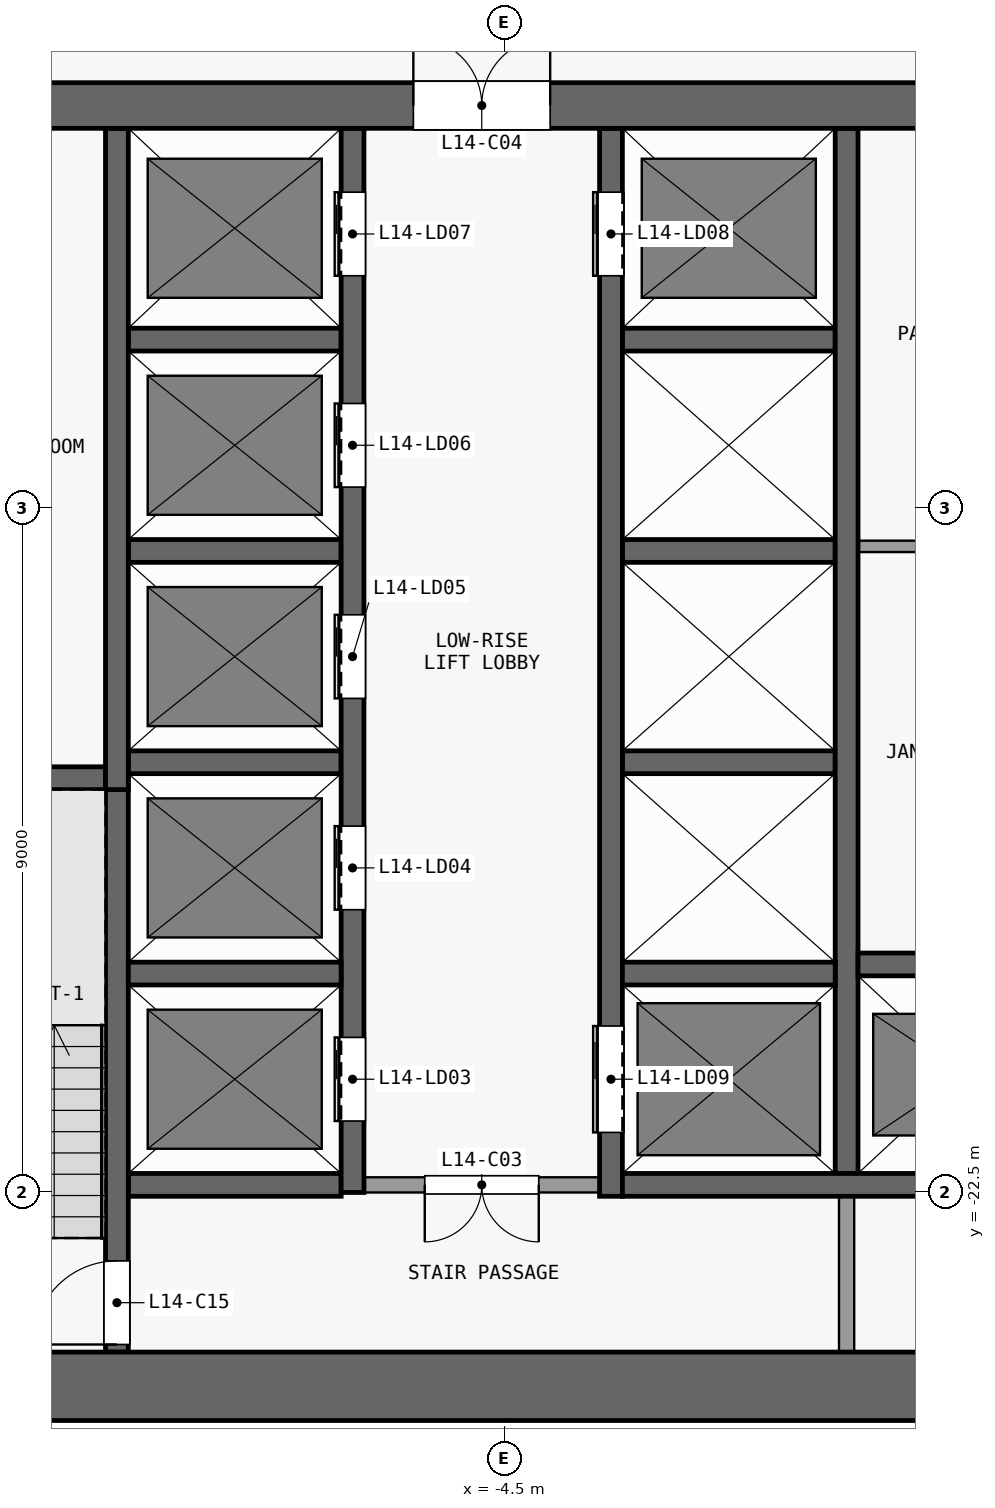
"""IFC4 building model, lengths in metres.
Left out: names, types, materials, properties, quantities, classifications, styles, units other than length and angle.
Written with IfcOpenShell. Run it as: python <this file> out.ifc"""

import sys

from ifc_helpers import new_model, si_unit, direction, frame, frame_2d, origin, place, context, subcontext, project, spatial, rectangle, extrude, element, fill, save


model = new_model("IFC4")
c1 = context("Model", 3, precision=1e-05, world=origin(), true_north=direction((0.0, 1.0)))
c2 = subcontext(c1, "Body", "Model", "MODEL_VIEW")
j1 = project(units=[si_unit("LENGTHUNIT", "METRE"), si_unit("PLANEANGLEUNIT", "RADIAN")], contexts=[c1])
p1 = place(None, origin())
s1 = spatial("IfcSite", under=j1, at=p1, CompositionType="ELEMENT")
p2 = place(p1, origin())
s2 = spatial("IfcBuilding", under=s1, at=p2, CompositionType="ELEMENT")
p3 = place(p2, frame((0.0, 0.0, 61.3)))
s3 = spatial("IfcBuildingStorey", under=s2, at=p3, CompositionType="ELEMENT", Elevation=61.3)
p4 = place(p3, frame((-13.5, -25.05, 0.0), z_axis=(0.0, 0.0, 1.0), x_axis=(1.0, 0.0, 0.0)))
e1 = element("IfcWall", 1, at=p4, inside=s3, PredefinedType="SHEAR", context=c2, shape_type="SweptSolid", body=[
    extrude(rectangle(XDim=27.0, YDim=0.9, at=frame_2d((13.5, 0.0))), origin(), (0.0, 0.0, 1.0), 3.3),
])
p5 = place(p3, frame((-13.5, -8.2, 0.0), z_axis=(0.0, 0.0, 1.0), x_axis=(1.0, 0.0, 0.0)))
e2 = element("IfcWall", 2, at=p5, inside=s3, PredefinedType="SHEAR", context=c2, shape_type="SweptSolid", body=[
    extrude(rectangle(XDim=27.0, YDim=0.6, at=frame_2d((13.5, 0.0))), origin(), (0.0, 0.0, 1.0), 3.3),
])
p6 = place(p5, frame((7.8, 0.0, 0.0)))
e3 = element("IfcOpeningElement", 3, at=p6, cuts=e2, PredefinedType="OPENING", context=c2, shape_type="SweptSolid", body=[
    extrude(rectangle(XDim=1.8, YDim=2.1, at=frame_2d((0.9, 1.05))), frame((0.0, 0.31, 0.0), z_axis=(0.0, -1.0, 0.0), x_axis=(1.0, 0.0, 0.0)), (0.0, 0.0, 1.0), 0.62),
])
p7 = place(p5, frame((17.4, 0.0, 0.0)))
e4 = element("IfcOpeningElement", 4, at=p7, cuts=e2, PredefinedType="OPENING", context=c2, shape_type="SweptSolid", body=[
    extrude(rectangle(XDim=1.8, YDim=2.1, at=frame_2d((0.9, 1.05))), frame((0.0, 0.31, 0.0), z_axis=(0.0, -1.0, 0.0), x_axis=(1.0, 0.0, 0.0)), (0.0, 0.0, 1.0), 0.62),
])
p8 = place(p5, frame((1.725, 0.0, 0.0)))
e5 = element("IfcOpeningElement", 5, at=p8, cuts=e2, PredefinedType="OPENING", context=c2, shape_type="SweptSolid", body=[
    extrude(rectangle(XDim=1.2, YDim=2.1, at=frame_2d((0.6, 1.05))), frame((0.0, 0.31, 0.0), z_axis=(0.0, -1.0, 0.0), x_axis=(1.0, 0.0, 0.0)), (0.0, 0.0, 1.0), 0.62),
])
p9 = place(p5, frame((23.375, 0.0, 0.0)))
e6 = element("IfcOpeningElement", 6, at=p9, cuts=e2, PredefinedType="OPENING", context=c2, shape_type="SweptSolid", body=[
    extrude(rectangle(XDim=0.9, YDim=2.1, at=frame_2d((0.45, 1.05))), frame((0.0, 0.31, 0.0), z_axis=(0.0, -1.0, 0.0), x_axis=(1.0, 0.0, 0.0)), (0.0, 0.0, 1.0), 0.62),
])
p10 = place(p3, frame((-9.45, -22.4, 0.0), z_axis=(0.0, 0.0, 1.0), x_axis=(1.0, 0.0, 0.0)))
e7 = element("IfcWall", 7, at=p10, inside=s3, PredefinedType="SHEAR", context=c2, shape_type="SweptSolid", body=[
    extrude(rectangle(XDim=2.8, YDim=0.3, at=frame_2d((1.4, 0.0))), origin(), (0.0, 0.0, 1.0), 3.3),
])
p11 = place(p3, frame((-3.25, -22.4, 0.0), z_axis=(0.0, 0.0, 1.0), x_axis=(-1.0, 0.0, 0.0)))
e8 = element("IfcWall", 8, at=p11, inside=s3, PredefinedType="PARTITIONING", context=c2, shape_type="SweptSolid", body=[
    extrude(rectangle(XDim=3.1, YDim=0.2, at=frame_2d((1.55, 0.0))), origin(), (0.0, 0.0, 1.0), 3.3),
])
p12 = place(p11, frame((0.8, 0.0, 0.0)))
e9 = element("IfcOpeningElement", 9, at=p12, cuts=e8, PredefinedType="OPENING", context=c2, shape_type="SweptSolid", body=[
    extrude(rectangle(XDim=1.5, YDim=2.1, at=frame_2d((0.75, 1.05))), frame((0.0, 0.11, 0.0), z_axis=(0.0, -1.0, 0.0), x_axis=(1.0, 0.0, 0.0)), (0.0, 0.0, 1.0), 0.22),
])
p13 = place(p3, frame((-2.95, -22.4, 0.0), z_axis=(0.0, 0.0, 1.0), x_axis=(1.0, 0.0, 0.0)))
e10 = element("IfcWall", 10, at=p13, inside=s3, PredefinedType="SHEAR", context=c2, shape_type="SweptSolid", body=[
    extrude(rectangle(XDim=6.2, YDim=0.3, at=frame_2d((3.1, 0.0))), origin(), (0.0, 0.0, 1.0), 3.3),
])
for number, where, z_axis, x_axis in (
    (11, (-9.45, -19.62, 0.0), (0.0, 0.0, 1.0), (1.0, 0.0, 0.0)),
    (12, (-2.95, -19.62, 0.0), (0.0, 0.0, 1.0), (1.0, 0.0, 0.0)),
):
    element("IfcWall", number, at=place(p3, frame(where, z_axis=z_axis, x_axis=x_axis)), inside=s3, PredefinedType="SHEAR", context=c2, shape_type="SweptSolid", body=[
        extrude(rectangle(XDim=2.8, YDim=0.3, at=frame_2d((1.4, 0.0))), origin(), (0.0, 0.0, 1.0), 3.3),
    ])
p14 = place(p3, frame((0.15, -19.5, 0.0), z_axis=(0.0, 0.0, 1.0), x_axis=(1.0, 0.0, 0.0)))
e13 = element("IfcWall", 13, at=p14, inside=s3, PredefinedType="SHEAR", context=c2, shape_type="SweptSolid", body=[
    extrude(rectangle(XDim=3.025, YDim=0.3, at=frame_2d((1.513, 0.0))), origin(), (0.0, 0.0, 1.0), 3.3),
])
p15 = place(p3, frame((-12.6, -17.05, 0.0), z_axis=(0.0, 0.0, 1.0), x_axis=(1.0, 0.0, 0.0)))
e14 = element("IfcWall", 14, at=p15, inside=s3, PredefinedType="SHEAR", context=c2, shape_type="SweptSolid", body=[
    extrude(rectangle(XDim=2.85, YDim=0.3, at=frame_2d((1.425, 0.0))), origin(), (0.0, 0.0, 1.0), 3.3),
])
for number, where, z_axis, x_axis in (
    (15, (-9.45, -16.84, 0.0), (0.0, 0.0, 1.0), (1.0, 0.0, 0.0)),
    (16, (-2.95, -16.84, 0.0), (0.0, 0.0, 1.0), (1.0, 0.0, 0.0)),
    (17, (-9.45, -14.06, 0.0), (0.0, 0.0, 1.0), (1.0, 0.0, 0.0)),
    (18, (-2.95, -14.06, 0.0), (0.0, 0.0, 1.0), (1.0, 0.0, 0.0)),
):
    element("IfcWall", number, at=place(p3, frame(where, z_axis=z_axis, x_axis=x_axis)), inside=s3, PredefinedType="SHEAR", context=c2, shape_type="SweptSolid", body=[
        extrude(rectangle(XDim=2.8, YDim=0.3, at=frame_2d((1.4, 0.0))), origin(), (0.0, 0.0, 1.0), 3.3),
    ])
p16 = place(p3, frame((0.15, -14.0, 0.0), z_axis=(0.0, 0.0, 1.0), x_axis=(1.0, 0.0, 0.0)))
e19 = element("IfcWall", 19, at=p16, inside=s3, PredefinedType="PARTITIONING", context=c2, shape_type="SweptSolid", body=[
    extrude(rectangle(XDim=2.875, YDim=0.15, at=frame_2d((1.438, 0.0))), origin(), (0.0, 0.0, 1.0), 3.3),
])
for number, where, z_axis, x_axis in (
    (20, (-9.45, -11.28, 0.0), (0.0, 0.0, 1.0), (1.0, 0.0, 0.0)),
    (21, (-2.95, -11.28, 0.0), (0.0, 0.0, 1.0), (1.0, 0.0, 0.0)),
):
    element("IfcWall", number, at=place(p3, frame(where, z_axis=z_axis, x_axis=x_axis)), inside=s3, PredefinedType="SHEAR", context=c2, shape_type="SweptSolid", body=[
        extrude(rectangle(XDim=2.8, YDim=0.3, at=frame_2d((1.4, 0.0))), origin(), (0.0, 0.0, 1.0), 3.3),
    ])
p17 = place(p3, frame((-9.6, -24.6, 0.0), z_axis=(0.0, 0.0, 1.0), x_axis=(0.0, 1.0, 0.0)))
e22 = element("IfcWall", 22, at=p17, inside=s3, PredefinedType="SHEAR", context=c2, shape_type="SweptSolid", body=[
    extrude(rectangle(XDim=7.7, YDim=0.3, at=frame_2d((3.85, 0.0))), origin(), (0.0, 0.0, 1.0), 3.3),
])
p18 = place(p17, frame((0.1, 0.0, 0.0)))
e23 = element("IfcOpeningElement", 23, at=p18, cuts=e22, PredefinedType="OPENING", context=c2, shape_type="SweptSolid", body=[
    extrude(rectangle(XDim=1.1, YDim=2.1, at=frame_2d((0.55, 1.05))), frame((0.0, 0.16, 0.0), z_axis=(0.0, -1.0, 0.0), x_axis=(1.0, 0.0, 0.0)), (0.0, 0.0, 1.0), 0.32),
])
p19 = place(p3, frame((-9.6, -17.2, 0.0), z_axis=(0.0, 0.0, 1.0), x_axis=(0.0, 1.0, 0.0)))
e24 = element("IfcWall", 24, at=p19, inside=s3, PredefinedType="SHEAR", context=c2, shape_type="SweptSolid", body=[
    extrude(rectangle(XDim=8.7, YDim=0.3, at=frame_2d((4.35, 0.0))), origin(), (0.0, 0.0, 1.0), 3.3),
])
p20 = place(p3, frame((-6.5, -22.5, 0.0), z_axis=(0.0, 0.0, 1.0), x_axis=(0.0, 1.0, 0.0)))
e25 = element("IfcWall", 25, at=p20, inside=s3, PredefinedType="SHEAR", context=c2, shape_type="SweptSolid", body=[
    extrude(rectangle(XDim=14.0, YDim=0.3, at=frame_2d((7.0, 0.0))), origin(), (0.0, 0.0, 1.0), 3.3),
])
p21 = place(p20, frame((0.94, 0.0, 0.0)))
e26 = element("IfcOpeningElement", 26, at=p21, cuts=e25, PredefinedType="OPENING", context=c2, shape_type="SweptSolid", body=[
    extrude(rectangle(XDim=1.1, YDim=2.1, at=frame_2d((0.55, 1.05))), frame((0.0, 0.16, 0.0), z_axis=(0.0, -1.0, 0.0), x_axis=(1.0, 0.0, 0.0)), (0.0, 0.0, 1.0), 0.32),
])
p22 = place(p20, frame((3.72, 0.0, 0.0)))
e27 = element("IfcOpeningElement", 27, at=p22, cuts=e25, PredefinedType="OPENING", context=c2, shape_type="SweptSolid", body=[
    extrude(rectangle(XDim=1.1, YDim=2.1, at=frame_2d((0.55, 1.05))), frame((0.0, 0.16, 0.0), z_axis=(0.0, -1.0, 0.0), x_axis=(1.0, 0.0, 0.0)), (0.0, 0.0, 1.0), 0.32),
])
p23 = place(p20, frame((6.5, 0.0, 0.0)))
e28 = element("IfcOpeningElement", 28, at=p23, cuts=e25, PredefinedType="OPENING", context=c2, shape_type="SweptSolid", body=[
    extrude(rectangle(XDim=1.1, YDim=2.1, at=frame_2d((0.55, 1.05))), frame((0.0, 0.16, 0.0), z_axis=(0.0, -1.0, 0.0), x_axis=(1.0, 0.0, 0.0)), (0.0, 0.0, 1.0), 0.32),
])
p24 = place(p20, frame((9.28, 0.0, 0.0)))
e29 = element("IfcOpeningElement", 29, at=p24, cuts=e25, PredefinedType="OPENING", context=c2, shape_type="SweptSolid", body=[
    extrude(rectangle(XDim=1.1, YDim=2.1, at=frame_2d((0.55, 1.05))), frame((0.0, 0.16, 0.0), z_axis=(0.0, -1.0, 0.0), x_axis=(1.0, 0.0, 0.0)), (0.0, 0.0, 1.0), 0.32),
])
p25 = place(p20, frame((12.06, 0.0, 0.0)))
e30 = element("IfcOpeningElement", 30, at=p25, cuts=e25, PredefinedType="OPENING", context=c2, shape_type="SweptSolid", body=[
    extrude(rectangle(XDim=1.1, YDim=2.1, at=frame_2d((0.55, 1.05))), frame((0.0, 0.16, 0.0), z_axis=(0.0, -1.0, 0.0), x_axis=(1.0, 0.0, 0.0)), (0.0, 0.0, 1.0), 0.32),
])
p26 = place(p3, frame((-3.1, -22.55, 0.0), z_axis=(0.0, 0.0, 1.0), x_axis=(0.0, 1.0, 0.0)))
e31 = element("IfcWall", 31, at=p26, inside=s3, PredefinedType="SHEAR", context=c2, shape_type="SweptSolid", body=[
    extrude(rectangle(XDim=14.05, YDim=0.3, at=frame_2d((7.025, 0.0))), origin(), (0.0, 0.0, 1.0), 3.3),
])
p27 = place(p26, frame((12.11, 0.0, 0.0)))
e32 = element("IfcOpeningElement", 32, at=p27, cuts=e31, PredefinedType="OPENING", context=c2, shape_type="SweptSolid", body=[
    extrude(rectangle(XDim=1.1, YDim=2.1, at=frame_2d((0.55, 1.05))), frame((0.0, 0.16, 0.0), z_axis=(0.0, -1.0, 0.0), x_axis=(1.0, 0.0, 0.0)), (0.0, 0.0, 1.0), 0.32),
])
p28 = place(p26, frame((0.84, 0.0, 0.0)))
e33 = element("IfcOpeningElement", 33, at=p28, cuts=e31, PredefinedType="OPENING", context=c2, shape_type="SweptSolid", body=[
    extrude(rectangle(XDim=1.4, YDim=2.1, at=frame_2d((0.7, 1.05))), frame((0.0, 0.16, 0.0), z_axis=(0.0, -1.0, 0.0), x_axis=(1.0, 0.0, 0.0)), (0.0, 0.0, 1.0), 0.32),
])
p29 = place(p3, frame((0.0, -24.6, 0.0), z_axis=(0.0, 0.0, 1.0), x_axis=(0.0, 1.0, 0.0)))
e34 = element("IfcWall", 34, at=p29, inside=s3, PredefinedType="PARTITIONING", context=c2, shape_type="SweptSolid", body=[
    extrude(rectangle(XDim=2.05, YDim=0.2, at=frame_2d((1.025, 0.0))), origin(), (0.0, 0.0, 1.0), 3.3),
])
p30 = place(p3, frame((0.0, -22.25, 0.0), z_axis=(0.0, 0.0, 1.0), x_axis=(0.0, 1.0, 0.0)))
e35 = element("IfcWall", 35, at=p30, inside=s3, PredefinedType="SHEAR", context=c2, shape_type="SweptSolid", body=[
    extrude(rectangle(XDim=13.75, YDim=0.3, at=frame_2d((6.875, 0.0))), origin(), (0.0, 0.0, 1.0), 3.3),
])
p31 = place(p21, origin())
e36 = element("IfcDoor", 36, at=p31, inside=s3, OperationType="DOUBLE_DOOR_SLIDING", PredefinedType="DOOR", context=c2, shape_type="SweptSolid", body=[
    extrude(rectangle(XDim=1.1, YDim=2.1, at=frame_2d((0.55, 1.05))), frame((0.0, 0.025, 0.0), z_axis=(0.0, -1.0, 0.0), x_axis=(1.0, 0.0, 0.0)), (0.0, 0.0, 1.0), 0.05),
])
fill(e26, e36)
p32 = place(p22, origin())
e37 = element("IfcDoor", 37, at=p32, inside=s3, OperationType="DOUBLE_DOOR_SLIDING", PredefinedType="DOOR", context=c2, shape_type="SweptSolid", body=[
    extrude(rectangle(XDim=1.1, YDim=2.1, at=frame_2d((0.55, 1.05))), frame((0.0, 0.025, 0.0), z_axis=(0.0, -1.0, 0.0), x_axis=(1.0, 0.0, 0.0)), (0.0, 0.0, 1.0), 0.05),
])
fill(e27, e37)
p33 = place(p23, origin())
e38 = element("IfcDoor", 38, at=p33, inside=s3, OperationType="DOUBLE_DOOR_SLIDING", PredefinedType="DOOR", context=c2, shape_type="SweptSolid", body=[
    extrude(rectangle(XDim=1.1, YDim=2.1, at=frame_2d((0.55, 1.05))), frame((0.0, 0.025, 0.0), z_axis=(0.0, -1.0, 0.0), x_axis=(1.0, 0.0, 0.0)), (0.0, 0.0, 1.0), 0.05),
])
fill(e28, e38)
p34 = place(p24, origin())
e39 = element("IfcDoor", 39, at=p34, inside=s3, OperationType="DOUBLE_DOOR_SLIDING", PredefinedType="DOOR", context=c2, shape_type="SweptSolid", body=[
    extrude(rectangle(XDim=1.1, YDim=2.1, at=frame_2d((0.55, 1.05))), frame((0.0, 0.025, 0.0), z_axis=(0.0, -1.0, 0.0), x_axis=(1.0, 0.0, 0.0)), (0.0, 0.0, 1.0), 0.05),
])
fill(e29, e39)
p35 = place(p25, origin())
e40 = element("IfcDoor", 40, at=p35, inside=s3, OperationType="DOUBLE_DOOR_SLIDING", PredefinedType="DOOR", context=c2, shape_type="SweptSolid", body=[
    extrude(rectangle(XDim=1.1, YDim=2.1, at=frame_2d((0.55, 1.05))), frame((0.0, 0.025, 0.0), z_axis=(0.0, -1.0, 0.0), x_axis=(1.0, 0.0, 0.0)), (0.0, 0.0, 1.0), 0.05),
])
fill(e30, e40)
p36 = place(p27, origin())
e41 = element("IfcDoor", 41, at=p36, inside=s3, OperationType="DOUBLE_DOOR_SLIDING", PredefinedType="DOOR", context=c2, shape_type="SweptSolid", body=[
    extrude(rectangle(XDim=1.1, YDim=2.1, at=frame_2d((0.55, 1.05))), frame((0.0, 0.025, 0.0), z_axis=(0.0, -1.0, 0.0), x_axis=(1.0, 0.0, 0.0)), (0.0, 0.0, 1.0), 0.05),
])
fill(e32, e41)
p37 = place(p28, origin())
e42 = element("IfcDoor", 42, at=p37, inside=s3, OperationType="DOUBLE_DOOR_SLIDING", PredefinedType="DOOR", context=c2, shape_type="SweptSolid", body=[
    extrude(rectangle(XDim=1.4, YDim=2.1, at=frame_2d((0.7, 1.05))), frame((0.0, 0.025, 0.0), z_axis=(0.0, -1.0, 0.0), x_axis=(1.0, 0.0, 0.0)), (0.0, 0.0, 1.0), 0.05),
])
fill(e33, e42)
p38 = place(p12, origin())
e43 = element("IfcDoor", 43, at=p38, inside=s3, OperationType="DOUBLE_DOOR_SINGLE_SWING", PredefinedType="DOOR", context=c2, shape_type="SweptSolid", body=[
    extrude(rectangle(XDim=1.5, YDim=2.1, at=frame_2d((0.75, 1.05))), frame((0.0, 0.025, 0.0), z_axis=(0.0, -1.0, 0.0), x_axis=(1.0, 0.0, 0.0)), (0.0, 0.0, 1.0), 0.05),
])
fill(e9, e43)
p39 = place(p6, origin())
e44 = element("IfcDoor", 44, at=p39, inside=s3, OperationType="DOUBLE_DOOR_SINGLE_SWING", PredefinedType="DOOR", context=c2, shape_type="SweptSolid", body=[
    extrude(rectangle(XDim=1.8, YDim=2.1, at=frame_2d((0.9, 1.05))), frame((0.0, 0.025, 0.0), z_axis=(0.0, -1.0, 0.0), x_axis=(1.0, 0.0, 0.0)), (0.0, 0.0, 1.0), 0.05),
])
fill(e3, e44)
p40 = place(p18, origin())
e45 = element("IfcDoor", 45, at=p40, inside=s3, OperationType="SINGLE_SWING_LEFT", PredefinedType="DOOR", context=c2, shape_type="SweptSolid", body=[
    extrude(rectangle(XDim=1.1, YDim=2.1, at=frame_2d((0.55, 1.05))), frame((0.0, 0.025, 0.0), z_axis=(0.0, -1.0, 0.0), x_axis=(1.0, 0.0, 0.0)), (0.0, 0.0, 1.0), 0.05),
])
fill(e23, e45)
save(model, sys.argv[1])
